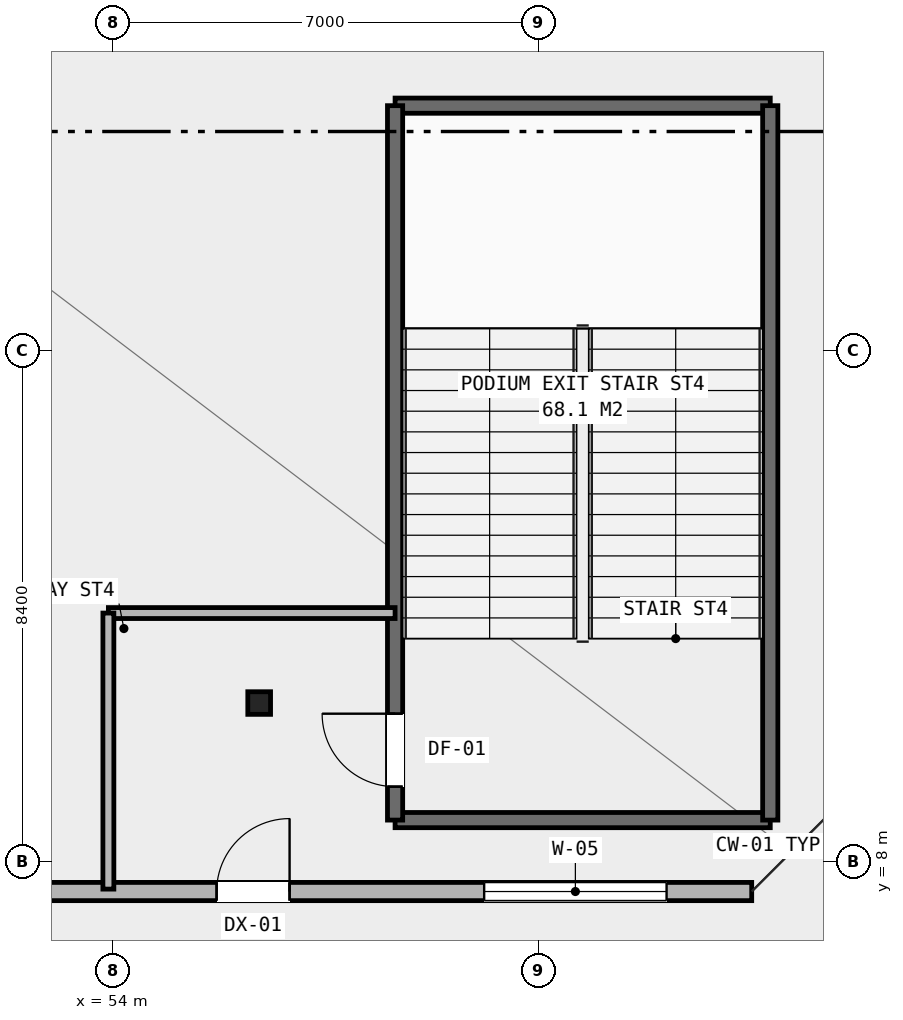
"""IFC4 building model, lengths in metres.
Left out: names, types, materials, properties, quantities, classifications, styles, units other than length and angle.
Written with IfcOpenShell. Run it as: python <this file> out.ifc"""

import sys

from ifc_helpers import new_model, si_unit, direction, frame, frame_2d, origin, origin_2d, place, context, subcontext, project, spatial, rectangle, i_section, extrude, element, fill, save


model = new_model("IFC4")
c1 = context("Model", 3, precision=1e-05, world=origin(), true_north=direction((0.0, 1.0)))
c2 = subcontext(c1, "Body", "Model", "MODEL_VIEW")
j1 = project(units=[si_unit("LENGTHUNIT", "METRE"), si_unit("PLANEANGLEUNIT", "RADIAN")], contexts=[c1])
p1 = place(None, origin())
s1 = spatial("IfcSite", under=j1, at=p1, CompositionType="ELEMENT")
p2 = place(p1, origin())
s2 = spatial("IfcBuilding", under=s1, at=p2, CompositionType="ELEMENT")
p3 = place(p2, origin())
s3 = spatial("IfcBuildingStorey", under=s2, at=p3, CompositionType="ELEMENT", Elevation=0.0)
p4 = place(p3, frame((56.4, 10.6, 0.0), z_axis=(0.0, 0.0, 1.0), x_axis=(1.0, 0.0, 0.0)))
e1 = element("IfcColumn", 1, at=p4, inside=s3, PredefinedType="COLUMN", context=c2, shape_type="SweptSolid", body=[
    extrude(i_section(OverallWidth=0.374, OverallDepth=0.372, WebThickness=0.016, FlangeThickness=0.026, at=origin_2d()), origin(), (0.0, 0.0, 1.0), 5.5),
])
p5 = place(p3, frame((15.5, 7.5, 0.0), z_axis=(0.0, 0.0, 1.0), x_axis=(1.0, 0.0, 0.0)))
e2 = element("IfcWall", 2, at=p5, inside=s3, PredefinedType="STANDARD", context=c2, shape_type="SweptSolid", body=[
    extrude(rectangle(XDim=49.0, YDim=0.3, at=frame_2d((24.5, 0.0))), origin(), (0.0, 0.0, 1.0), 5.22),
])
p6 = place(p5, frame((2.2, 0.0, 0.0)))
e3 = element("IfcOpeningElement", 3, at=p6, cuts=e2, PredefinedType="OPENING", context=c2, shape_type="SweptSolid", body=[
    extrude(rectangle(XDim=2.4, YDim=2.6, at=frame_2d((1.2, 1.3))), frame((0.0, 0.16, 0.0), z_axis=(0.0, -1.0, 0.0), x_axis=(1.0, 0.0, 0.0)), (0.0, 0.0, 1.0), 0.32),
])
p7 = place(p5, frame((22.0, 0.0, 0.0)))
e4 = element("IfcOpeningElement", 4, at=p7, cuts=e2, PredefinedType="OPENING", context=c2, shape_type="SweptSolid", body=[
    extrude(rectangle(XDim=2.4, YDim=2.6, at=frame_2d((1.2, 1.3))), frame((0.0, 0.16, 0.0), z_axis=(0.0, -1.0, 0.0), x_axis=(1.0, 0.0, 0.0)), (0.0, 0.0, 1.0), 0.32),
])
p8 = place(p5, frame((32.8, 0.0, 0.0)))
e5 = element("IfcOpeningElement", 5, at=p8, cuts=e2, PredefinedType="OPENING", context=c2, shape_type="SweptSolid", body=[
    extrude(rectangle(XDim=2.4, YDim=2.6, at=frame_2d((1.2, 1.3))), frame((0.0, 0.16, 0.0), z_axis=(0.0, -1.0, 0.0), x_axis=(1.0, 0.0, 0.0)), (0.0, 0.0, 1.0), 0.32),
])
p9 = place(p5, frame((7.9, 0.0, 0.0)))
e6 = element("IfcOpeningElement", 6, at=p9, cuts=e2, PredefinedType="OPENING", context=c2, shape_type="SweptSolid", body=[
    extrude(rectangle(XDim=1.2, YDim=2.2, at=frame_2d((0.6, 1.1))), frame((0.0, 0.16, 0.0), z_axis=(0.0, -1.0, 0.0), x_axis=(1.0, 0.0, 0.0)), (0.0, 0.0, 1.0), 0.32),
])
p10 = place(p5, frame((40.2, 0.0, 0.0)))
e7 = element("IfcOpeningElement", 7, at=p10, cuts=e2, PredefinedType="OPENING", context=c2, shape_type="SweptSolid", body=[
    extrude(rectangle(XDim=1.2, YDim=2.2, at=frame_2d((0.6, 1.1))), frame((0.0, 0.16, 0.0), z_axis=(0.0, -1.0, 0.0), x_axis=(1.0, 0.0, 0.0)), (0.0, 0.0, 1.0), 0.32),
])
p11 = place(p5, frame((12.0, 0.0, 3.2)))
e8 = element("IfcOpeningElement", 8, at=p11, cuts=e2, PredefinedType="OPENING", context=c2, shape_type="SweptSolid", body=[
    extrude(rectangle(XDim=3.0, YDim=1.2, at=frame_2d((1.5, 0.6))), frame((0.0, 0.16, 0.0), z_axis=(0.0, -1.0, 0.0), x_axis=(1.0, 0.0, 0.0)), (0.0, 0.0, 1.0), 0.32),
])
p12 = place(p5, frame((17.6, 0.0, 3.2)))
e9 = element("IfcOpeningElement", 9, at=p12, cuts=e2, PredefinedType="OPENING", context=c2, shape_type="SweptSolid", body=[
    extrude(rectangle(XDim=3.0, YDim=1.2, at=frame_2d((1.5, 0.6))), frame((0.0, 0.16, 0.0), z_axis=(0.0, -1.0, 0.0), x_axis=(1.0, 0.0, 0.0)), (0.0, 0.0, 1.0), 0.32),
])
p13 = place(p5, frame((27.6, 0.0, 3.2)))
e10 = element("IfcOpeningElement", 10, at=p13, cuts=e2, PredefinedType="OPENING", context=c2, shape_type="SweptSolid", body=[
    extrude(rectangle(XDim=3.0, YDim=1.2, at=frame_2d((1.5, 0.6))), frame((0.0, 0.16, 0.0), z_axis=(0.0, -1.0, 0.0), x_axis=(1.0, 0.0, 0.0)), (0.0, 0.0, 1.0), 0.32),
])
p14 = place(p5, frame((44.6, 0.0, 3.2)))
e11 = element("IfcOpeningElement", 11, at=p14, cuts=e2, PredefinedType="OPENING", context=c2, shape_type="SweptSolid", body=[
    extrude(rectangle(XDim=3.0, YDim=1.2, at=frame_2d((1.5, 0.6))), frame((0.0, 0.16, 0.0), z_axis=(0.0, -1.0, 0.0), x_axis=(1.0, 0.0, 0.0)), (0.0, 0.0, 1.0), 0.32),
])
for number, where, z_axis, x_axis in (
    (12, (58.635, 20.425, 0.0), (0.0, 0.0, 1.0), (1.0, 0.0, 0.0)),
    (13, (58.635, 8.675, 0.0), (0.0, 0.0, 1.0), (1.0, 0.0, 0.0)),
):
    element("IfcWall", number, at=place(p3, frame(where, z_axis=z_axis, x_axis=x_axis)), inside=s3, PredefinedType="SHEAR", context=c2, shape_type="SweptSolid", body=[
        extrude(rectangle(XDim=6.17, YDim=0.25, at=frame_2d((3.085, 0.0))), origin(), (0.0, 0.0, 1.0), 5.22),
    ])
p15 = place(p3, frame((58.635, 8.675, 0.0), z_axis=(0.0, 0.0, 1.0), x_axis=(0.0, 1.0, 0.0)))
e14 = element("IfcWall", 14, at=p15, inside=s3, PredefinedType="SHEAR", context=c2, shape_type="SweptSolid", body=[
    extrude(rectangle(XDim=11.75, YDim=0.25, at=frame_2d((5.875, 0.0))), origin(), (0.0, 0.0, 1.0), 5.22),
])
p16 = place(p15, frame((0.55, 0.0, 0.0)))
e15 = element("IfcOpeningElement", 15, at=p16, cuts=e14, PredefinedType="OPENING", context=c2, shape_type="SweptSolid", body=[
    extrude(rectangle(XDim=1.2, YDim=2.15, at=frame_2d((0.6, 1.075))), frame((0.0, 0.135, 0.0), z_axis=(0.0, -1.0, 0.0), x_axis=(1.0, 0.0, 0.0)), (0.0, 0.0, 1.0), 0.27),
])
p17 = place(p3, frame((64.805, 8.675, 0.0), z_axis=(0.0, 0.0, 1.0), x_axis=(0.0, 1.0, 0.0)))
e16 = element("IfcWall", 16, at=p17, inside=s3, PredefinedType="SHEAR", context=c2, shape_type="SweptSolid", body=[
    extrude(rectangle(XDim=11.75, YDim=0.25, at=frame_2d((5.875, 0.0))), origin(), (0.0, 0.0, 1.0), 5.22),
])
p18 = place(p3, frame((53.92, 12.08, 0.0), z_axis=(0.0, 0.0, 1.0), x_axis=(1.0, 0.0, 0.0)))
e17 = element("IfcWall", 17, at=p18, inside=s3, PredefinedType="PARTITIONING", context=c2, shape_type="SweptSolid", body=[
    extrude(rectangle(XDim=4.715, YDim=0.18, at=frame_2d((2.357, 0.0))), origin(), (0.0, 0.0, 1.0), 4.671),
])
p19 = place(p3, frame((53.92, 7.54, 0.0), z_axis=(0.0, 0.0, 1.0), x_axis=(0.0, 1.0, 0.0)))
e18 = element("IfcWall", 18, at=p19, inside=s3, PredefinedType="PARTITIONING", context=c2, shape_type="SweptSolid", body=[
    extrude(rectangle(XDim=4.54, YDim=0.18, at=frame_2d((2.27, 0.0))), origin(), (0.0, 0.0, 1.0), 4.671),
])
p20 = place(p10, frame((1.2, 0.0, 0.0), z_axis=(0.0, 0.0, 1.0), x_axis=(-1.0, 0.0, 0.0)))
e19 = element("IfcDoor", 19, at=p20, inside=s3, OperationType="SINGLE_SWING_RIGHT", PredefinedType="DOOR", context=c2, shape_type="SweptSolid", body=[
    extrude(rectangle(XDim=1.2, YDim=2.2, at=frame_2d((0.6, 1.1))), frame((0.0, 0.025, 0.0), z_axis=(0.0, -1.0, 0.0), x_axis=(1.0, 0.0, 0.0)), (0.0, 0.0, 1.0), 0.05),
])
fill(e7, e19)
p21 = place(p14, origin())
e20 = element("IfcWindow", 20, at=p21, inside=s3, PartitioningType="SINGLE_PANEL", PredefinedType="WINDOW", context=c2, shape_type="SweptSolid", body=[
    extrude(rectangle(XDim=3.0, YDim=1.2, at=frame_2d((1.5, 0.6))), frame((0.0, 0.03, 0.0), z_axis=(0.0, -1.0, 0.0), x_axis=(1.0, 0.0, 0.0)), (0.0, 0.0, 1.0), 0.06),
])
fill(e11, e20)
p22 = place(p16, origin())
e21 = element("IfcDoor", 21, at=p22, inside=s3, OperationType="SINGLE_SWING_RIGHT", PredefinedType="DOOR", context=c2, shape_type="SweptSolid", body=[
    extrude(rectangle(XDim=1.2, YDim=2.15, at=frame_2d((0.6, 1.075))), frame((0.0, 0.025, 0.0), z_axis=(0.0, -1.0, 0.0), x_axis=(1.0, 0.0, 0.0)), (0.0, 0.0, 1.0), 0.05),
])
fill(e15, e21)
save(model, sys.argv[1])
